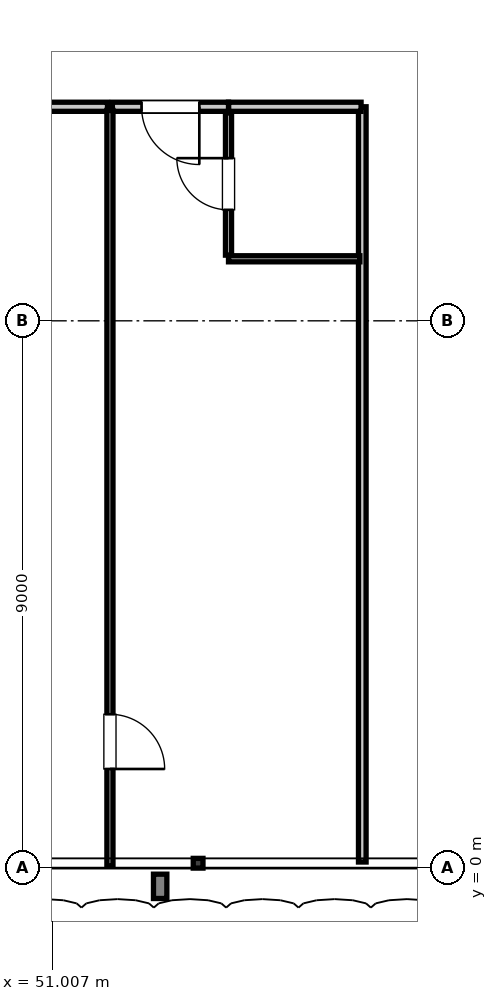
"""IFC4 building model, lengths in metres.
Left out: names, types, materials, properties, quantities, classifications, styles, units other than length and angle.
Written with IfcOpenShell. Run it as: python <this file> out.ifc"""

import sys

from ifc_helpers import new_model, si_unit, direction, frame, frame_2d, origin, place, context, subcontext, project, spatial, rectangle, extrude, element, fill, save


model = new_model("IFC4")
c1 = context("Model", 3, precision=1e-05, world=origin(), true_north=direction((0.0, 1.0)))
c2 = subcontext(c1, "Body", "Model", "MODEL_VIEW")
j1 = project(units=[si_unit("LENGTHUNIT", "METRE"), si_unit("PLANEANGLEUNIT", "RADIAN")], contexts=[c1])
p1 = place(None, origin())
s1 = spatial("IfcSite", under=j1, at=p1, CompositionType="ELEMENT")
p2 = place(p1, origin())
s2 = spatial("IfcBuilding", under=s1, at=p2, CompositionType="ELEMENT")
p3 = place(p2, frame((0.0, 0.0, 38.5)))
s3 = spatial("IfcBuildingStorey", under=s2, at=p3, CompositionType="ELEMENT", Elevation=38.5)
p4 = place(p3, frame((56.1, 0.1, 0.0), z_axis=(0.0, 0.0, 1.0), x_axis=(0.0, 1.0, 0.0)))
e1 = element("IfcWall", 1, at=p4, inside=s3, PredefinedType="PARTITIONING", context=c2, shape_type="SweptSolid", body=[
    extrude(rectangle(XDim=12.42, YDim=0.125, at=frame_2d((6.21, 0.0))), origin(), (0.0, 0.0, 1.0), 3.61),
])
p5 = place(p3, frame((53.9, 12.52, 0.0), z_axis=(0.0, 0.0, 1.0), x_axis=(1.0, 0.0, 0.0)))
e2 = element("IfcWall", 2, at=p5, inside=s3, PredefinedType="PARTITIONING", context=c2, shape_type="SweptSolid", body=[
    extrude(rectangle(XDim=2.18, YDim=0.15, at=frame_2d((1.09, 0.0))), origin(), (0.0, 0.0, 1.0), 3.61),
])
p6 = place(p3, frame((53.9, 10.02, 0.0), z_axis=(0.0, 0.0, 1.0), x_axis=(1.0, 0.0, 0.0)))
e3 = element("IfcWall", 3, at=p6, inside=s3, PredefinedType="PARTITIONING", context=c2, shape_type="SweptSolid", body=[
    extrude(rectangle(XDim=2.16, YDim=0.1, at=frame_2d((1.08, 0.0))), origin(), (0.0, 0.0, 1.0), 3.61),
])
p7 = place(p3, frame((53.9, 10.08, 0.0), z_axis=(0.0, 0.0, 1.0), x_axis=(0.0, 1.0, 0.0)))
e4 = element("IfcWall", 4, at=p7, inside=s3, PredefinedType="PARTITIONING", context=c2, shape_type="SweptSolid", body=[
    extrude(rectangle(XDim=2.34, YDim=0.1, at=frame_2d((1.17, 0.0))), origin(), (0.0, 0.0, 1.0), 3.61),
])
p8 = place(p7, frame((0.745, 0.0, 0.0)))
e5 = element("IfcOpeningElement", 5, at=p8, cuts=e4, PredefinedType="OPENING", context=c2, shape_type="SweptSolid", body=[
    extrude(rectangle(XDim=0.85, YDim=2.1, at=frame_2d((0.425, 1.05))), frame((0.0, 0.06, 0.0), z_axis=(0.0, -1.0, 0.0), x_axis=(1.0, 0.0, 0.0)), (0.0, 0.0, 1.0), 0.12),
])
p9 = place(p3, frame((50.02, 12.52, 0.0), z_axis=(0.0, 0.0, 1.0), x_axis=(1.0, 0.0, 0.0)))
e6 = element("IfcWall", 6, at=p9, inside=s3, PredefinedType="PARTITIONING", context=c2, shape_type="SweptSolid", body=[
    extrude(rectangle(XDim=1.89, YDim=0.15, at=frame_2d((0.945, 0.0))), origin(), (0.0, 0.0, 1.0), 3.61),
])
p10 = place(p3, frame((51.99, 12.52, 0.0), z_axis=(0.0, 0.0, 1.0), x_axis=(1.0, 0.0, 0.0)))
e7 = element("IfcWall", 7, at=p10, inside=s3, PredefinedType="PARTITIONING", context=c2, shape_type="SweptSolid", body=[
    extrude(rectangle(XDim=1.91, YDim=0.15, at=frame_2d((0.955, 0.0))), origin(), (0.0, 0.0, 1.0), 3.61),
])
p11 = place(p10, frame((0.48, 0.0, 0.0)))
e8 = element("IfcOpeningElement", 8, at=p11, cuts=e7, PredefinedType="OPENING", context=c2, shape_type="SweptSolid", body=[
    extrude(rectangle(XDim=0.95, YDim=2.15, at=frame_2d((0.475, 1.075))), frame((0.0, 0.085, 0.0), z_axis=(0.0, -1.0, 0.0), x_axis=(1.0, 0.0, 0.0)), (0.0, 0.0, 1.0), 0.17),
])
p12 = place(p3, frame((51.95, 0.03, 0.0), z_axis=(0.0, 0.0, 1.0), x_axis=(0.0, 1.0, 0.0)))
e9 = element("IfcWall", 9, at=p12, inside=s3, PredefinedType="PARTITIONING", context=c2, shape_type="SweptSolid", body=[
    extrude(rectangle(XDim=12.43, YDim=0.1, at=frame_2d((6.215, 0.0))), origin(), (0.0, 0.0, 1.0), 3.61),
])
p13 = place(p12, frame((1.6, 0.0, 0.0)))
e10 = element("IfcOpeningElement", 10, at=p13, cuts=e9, PredefinedType="OPENING", context=c2, shape_type="SweptSolid", body=[
    extrude(rectangle(XDim=0.9, YDim=2.1, at=frame_2d((0.45, 1.05))), frame((0.0, 0.06, 0.0), z_axis=(0.0, -1.0, 0.0), x_axis=(1.0, 0.0, 0.0)), (0.0, 0.0, 1.0), 0.12),
])
p14 = place(p8, origin())
e11 = element("IfcDoor", 11, at=p14, inside=s3, OperationType="SINGLE_SWING_RIGHT", PredefinedType="DOOR", context=c2, shape_type="SweptSolid", body=[
    extrude(rectangle(XDim=0.85, YDim=2.1, at=frame_2d((0.425, 1.05))), frame((0.0, 0.025, 0.0), z_axis=(0.0, -1.0, 0.0), x_axis=(1.0, 0.0, 0.0)), (0.0, 0.0, 1.0), 0.05),
])
fill(e5, e11)
p15 = place(p11, frame((0.95, 0.0, 0.0), z_axis=(0.0, 0.0, 1.0), x_axis=(-1.0, 0.0, 0.0)))
e12 = element("IfcDoor", 12, at=p15, inside=s3, OperationType="SINGLE_SWING_LEFT", PredefinedType="DOOR", context=c2, shape_type="SweptSolid", body=[
    extrude(rectangle(XDim=0.95, YDim=2.15, at=frame_2d((0.475, 1.075))), frame((0.0, 0.025, 0.0), z_axis=(0.0, -1.0, 0.0), x_axis=(1.0, 0.0, 0.0)), (0.0, 0.0, 1.0), 0.05),
])
fill(e8, e12)
p16 = place(p13, frame((0.9, 0.0, 0.0), z_axis=(0.0, 0.0, 1.0), x_axis=(-1.0, 0.0, 0.0)))
e13 = element("IfcDoor", 13, at=p16, inside=s3, OperationType="SINGLE_SWING_RIGHT", PredefinedType="DOOR", context=c2, shape_type="SweptSolid", body=[
    extrude(rectangle(XDim=0.9, YDim=2.1, at=frame_2d((0.45, 1.05))), frame((0.0, 0.025, 0.0), z_axis=(0.0, -1.0, 0.0), x_axis=(1.0, 0.0, 0.0)), (0.0, 0.0, 1.0), 0.05),
])
fill(e10, e13)
save(model, sys.argv[1])
